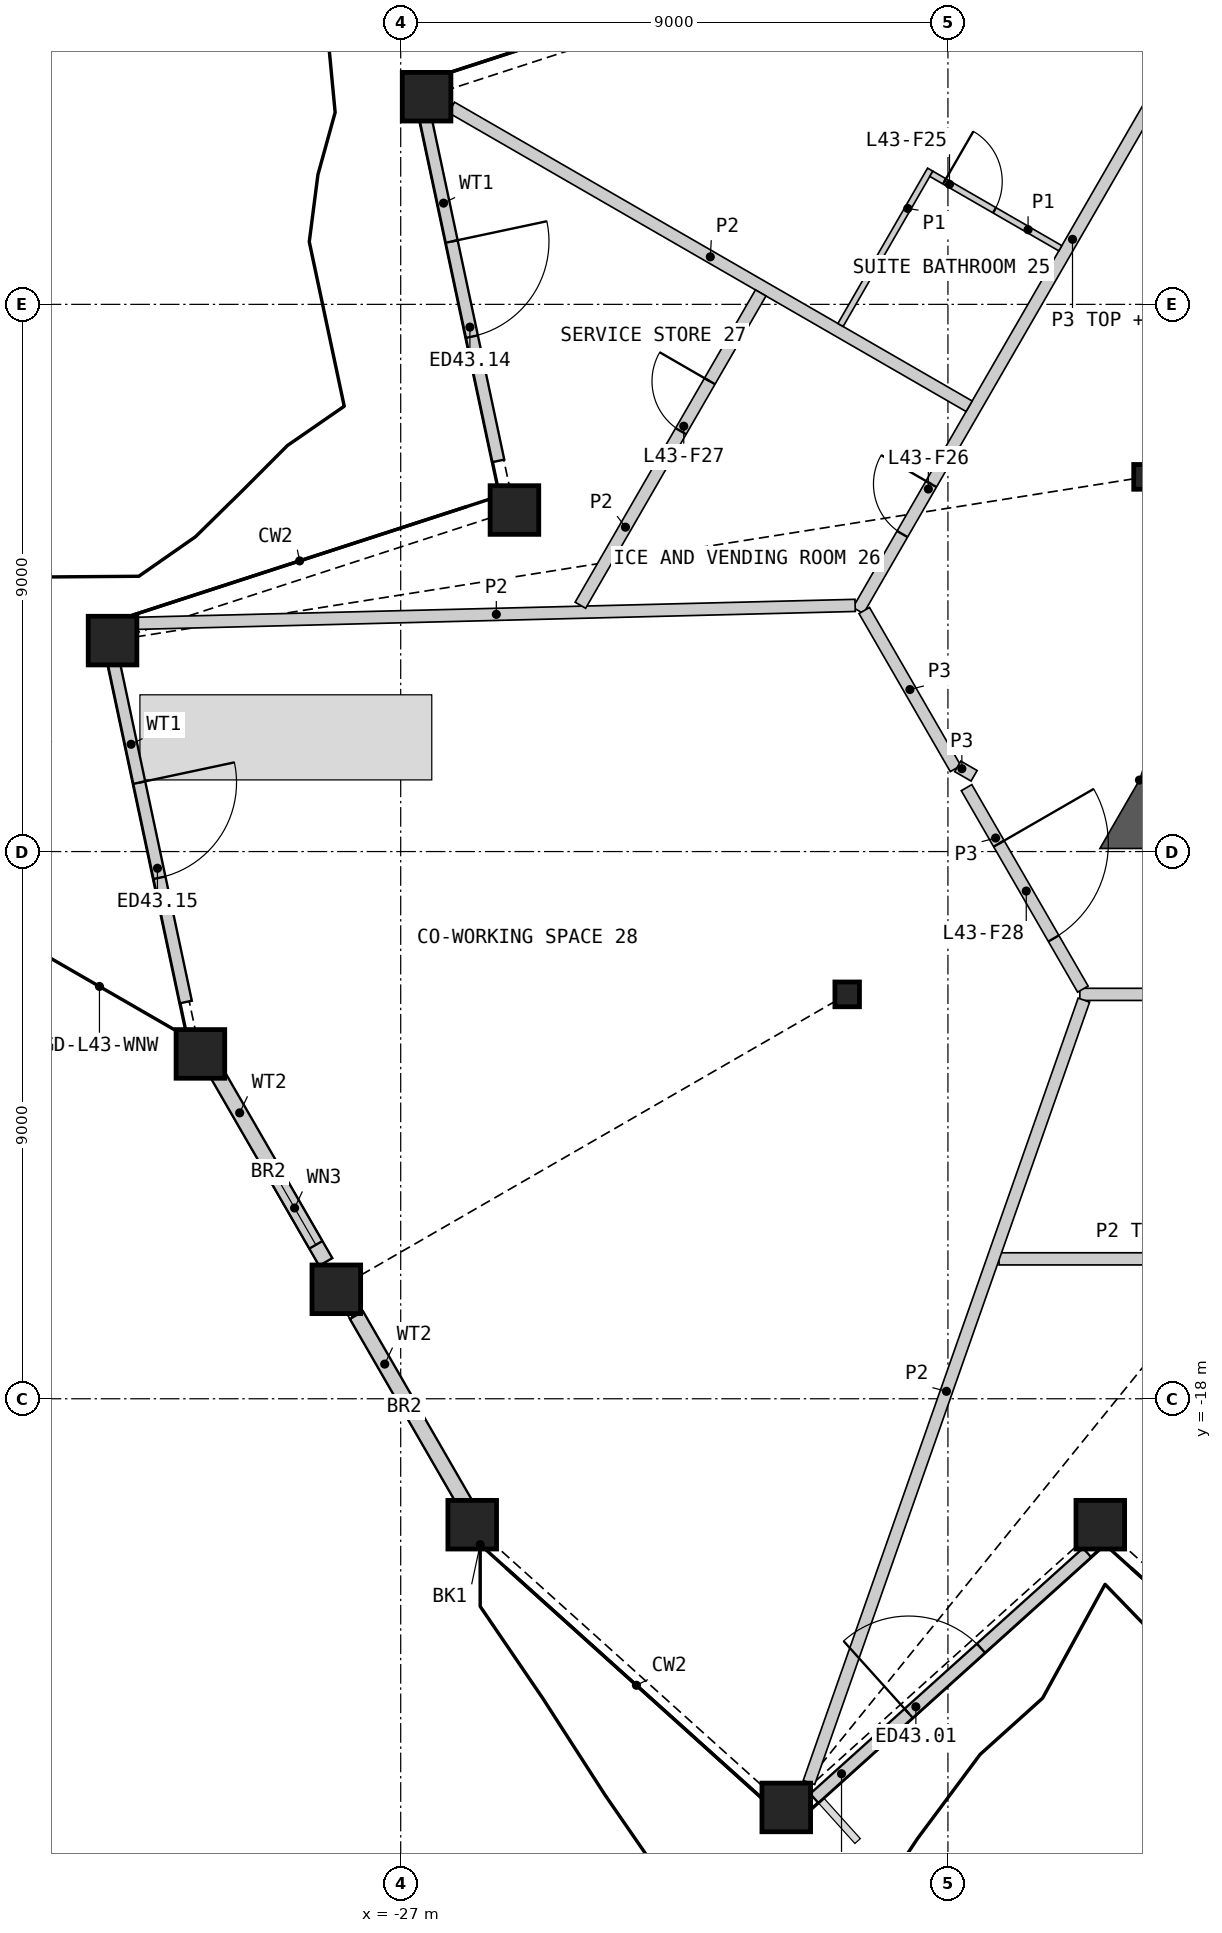
"""IFC4 building model, lengths in metres.
Left out: names, types, materials, properties, quantities, classifications, styles, units other than length and angle.
Written with IfcOpenShell. Run it as: python <this file> out.ifc"""

import sys

from ifc_helpers import new_model, si_unit, direction, frame, frame_2d, origin, origin_2d, place, context, subcontext, project, spatial, polyline, rectangle, hollow_rectangle, i_section, outline, extrude, element, fill, save


model = new_model("IFC4")
c1 = context("Model", 3, precision=1e-05, world=origin(), true_north=direction((0.0, 1.0)))
c2 = subcontext(c1, "Body", "Model", "MODEL_VIEW")
j1 = project(units=[si_unit("LENGTHUNIT", "METRE"), si_unit("PLANEANGLEUNIT", "RADIAN")], contexts=[c1])
p1 = place(None, origin())
s1 = spatial("IfcSite", under=j1, at=p1, CompositionType="ELEMENT")
p2 = place(p1, origin())
s2 = spatial("IfcBuilding", under=s1, at=p2, CompositionType="ELEMENT")
p3 = place(p2, frame((0.0, 0.0, 198.0)))
s3 = spatial("IfcBuildingStorey", under=s2, at=p3, CompositionType="ELEMENT", Elevation=198.0)
for number, where, z_axis, x_axis in (
    (1, (-25.823, -20.071, 0.0), (0.0, 0.0, 1.0), (1.0, 0.0, 0.0)),
    (2, (-20.659, -24.722, 0.0), (0.0, 0.0, 1.0), (1.0, 0.0, 0.0)),
    (3, (-15.494, -20.071, 0.0), (0.0, 0.0, 1.0), (1.0, 0.0, 0.0)),
    (4, (-26.574, 3.415, 0.0), (0.0, 0.0, 1.0), (1.0, 0.0, 0.0)),
    (5, (-25.129, -3.383, 0.0), (0.0, 0.0, 1.0), (1.0, 0.0, 0.0)),
    (6, (-31.739, -5.53, 0.0), (0.0, 0.0, 1.0), (1.0, 0.0, 0.0)),
    (7, (-30.294, -12.328, 0.0), (0.0, 0.0, 1.0), (1.0, 0.0, 0.0)),
    (8, (-28.059, -16.2, 0.0), (0.0, 0.0, 1.0), (1.0, 0.0, 0.0)),
):
    element("IfcColumn", number, at=place(p3, frame(where, z_axis=z_axis, x_axis=x_axis)), inside=s3, PredefinedType="COLUMN", context=c2, shape_type="SweptSolid", body=[
        extrude(hollow_rectangle(XDim=0.8, YDim=0.8, WallThickness=0.05, at=origin_2d()), origin(), (0.0, 0.0, 1.0), 3.6),
    ])
for number, where, z_axis, x_axis in (
    (9, (-14.743, -2.837, 0.0), (0.0, 0.0, 1.0), (1.0, 0.0, 0.0)),
    (10, (-19.657, -11.349, 0.0), (0.0, 0.0, 1.0), (1.0, 0.0, 0.0)),
):
    element("IfcColumn", number, at=place(p3, frame(where, z_axis=z_axis, x_axis=x_axis)), inside=s3, PredefinedType="COLUMN", context=c2, shape_type="SweptSolid", body=[
        extrude(i_section(OverallWidth=0.404, OverallDepth=0.407, WebThickness=0.027, FlangeThickness=0.044, at=origin_2d()), origin(), (0.0, 0.0, 1.0), 3.6),
    ])
p4 = place(p3, frame((-20.199, -24.571, 0.0), z_axis=(0.0, 0.0, 1.0), x_axis=(0.743151394339, 0.669123310827, 0.0)))
e11 = element("IfcWall", 11, at=p4, inside=s3, PredefinedType="SOLIDWALL", context=c2, shape_type="SweptSolid", body=[
    extrude(rectangle(XDim=6.039, YDim=0.2, at=frame_2d((3.019, 0.0))), origin(), (0.0, 0.0, 1.0), 2.701),
])
p5 = place(p4, frame((2.089, 0.0, 0.0)))
e12 = element("IfcOpeningElement", 12, at=p5, cuts=e11, PredefinedType="OPENING", context=c2, shape_type="SweptSolid", body=[
    extrude(rectangle(XDim=1.6, YDim=2.4, at=frame_2d((0.8, 1.2))), frame((0.0, 0.11, 0.0), z_axis=(0.0, -1.0, 0.0), x_axis=(1.0, 0.0, 0.0)), (0.0, 0.0, 1.0), 0.22),
])
p6 = place(p3, frame((-26.595, 3.078, 0.0), z_axis=(0.0, 0.0, 1.0), x_axis=(0.207907263894, -0.978148541695, 0.0)))
e13 = element("IfcWall", 13, at=p6, inside=s3, PredefinedType="SOLIDWALL", context=c2, shape_type="SweptSolid", body=[
    extrude(rectangle(XDim=5.779, YDim=0.2, at=frame_2d((2.889, 0.0))), origin(), (0.0, 0.0, 1.0), 2.701),
])
p7 = place(p6, frame((2.089, 0.0, 0.0)))
e14 = element("IfcOpeningElement", 14, at=p7, cuts=e13, PredefinedType="OPENING", context=c2, shape_type="SweptSolid", body=[
    extrude(rectangle(XDim=1.6, YDim=2.4, at=frame_2d((0.8, 1.2))), frame((0.0, 0.11, 0.0), z_axis=(0.0, -1.0, 0.0), x_axis=(1.0, 0.0, 0.0)), (0.0, 0.0, 1.0), 0.22),
])
p8 = place(p3, frame((-31.734, -5.822, 0.0), z_axis=(0.0, 0.0, 1.0), x_axis=(0.207907263894, -0.978148541695, 0.0)))
e15 = element("IfcWall", 15, at=p8, inside=s3, PredefinedType="SOLIDWALL", context=c2, shape_type="SweptSolid", body=[
    extrude(rectangle(XDim=5.779, YDim=0.2, at=frame_2d((2.889, 0.0))), origin(), (0.0, 0.0, 1.0), 2.701),
])
p9 = place(p8, frame((2.089, 0.0, 0.0)))
e16 = element("IfcOpeningElement", 16, at=p9, cuts=e15, PredefinedType="OPENING", context=c2, shape_type="SweptSolid", body=[
    extrude(rectangle(XDim=1.6, YDim=2.4, at=frame_2d((0.8, 1.2))), frame((0.0, 0.11, 0.0), z_axis=(0.0, -1.0, 0.0), x_axis=(1.0, 0.0, 0.0)), (0.0, 0.0, 1.0), 0.22),
])
p10 = place(p3, frame((-30.12, -12.48, 0.0), z_axis=(0.0, 0.0, 1.0), x_axis=(0.500034075199, -0.866005729565, 0.0)))
e17 = element("IfcWall", 17, at=p10, inside=s3, PredefinedType="SOLIDWALL", context=c2, shape_type="SweptSolid", body=[
    extrude(rectangle(XDim=3.775, YDim=0.25, at=frame_2d((1.888, 0.0))), origin(), (0.0, 0.0, 1.0), 2.701),
])
p11 = place(p10, frame((2.05, 0.0, 1.7)))
e18 = element("IfcOpeningElement", 18, at=p11, cuts=e17, PredefinedType="OPENING", context=c2, shape_type="SweptSolid", body=[
    extrude(rectangle(XDim=1.4, YDim=0.8, at=frame_2d((0.7, 0.4))), frame((0.0, 0.135, 0.0), z_axis=(0.0, -1.0, 0.0), x_axis=(1.0, 0.0, 0.0)), (0.0, 0.0, 1.0), 0.27),
])
p12 = place(p3, frame((-27.727, -16.625, 0.0), z_axis=(0.0, 0.0, 1.0), x_axis=(0.499995303914, -0.866028115054, 0.0)))
e19 = element("IfcWall", 19, at=p12, inside=s3, PredefinedType="SOLIDWALL", context=c2, shape_type="SweptSolid", body=[
    extrude(rectangle(XDim=3.718, YDim=0.25, at=frame_2d((1.859, 0.0))), origin(), (0.0, 0.0, 1.0), 2.701),
])
p13 = place(p3, frame((-12.65, -4.763, 0.0), z_axis=(0.0, 0.0, 1.0), x_axis=(-0.499996681051, -0.866027319972, 0.0)))
e20 = element("IfcWall", 20, at=p13, inside=s3, PredefinedType="SHEAR", context=c2, shape_type="SweptSolid", body=[
    extrude(rectangle(XDim=3.75, YDim=0.75, at=frame_2d((1.875, 0.0))), origin(), (0.0, 0.0, 1.0), 3.25),
])
p14 = place(p3, origin())
e21 = element("IfcWall", 21, at=p14, inside=s3, PredefinedType="SHEAR", context=c2, shape_type="SweptSolid", body=[
    extrude(outline(polyline([(-14.851, -7.824), (-14.201, -8.199), (-14.201, -8.949), (-15.5, -8.949), (-14.851, -7.824)])), origin(), (0.0, 0.0, 1.0), 3.25),
])
p15 = place(p3, frame((-19.476, -5.035, 0.0), z_axis=(0.0, 0.0, 1.0), x_axis=(0.500000757641, 0.86602496636, 0.0)))
e22 = element("IfcWall", 22, at=p15, inside=s3, PredefinedType="PARTITIONING", context=c2, shape_type="SweptSolid", body=[
    extrude(rectangle(XDim=28.198, YDim=0.2, at=frame_2d((14.099, 0.0))), origin(), (0.0, 0.0, 1.0), 3.25),
])
p16 = place(p15, frame((25.796, 0.0, 0.0)))
e23 = element("IfcOpeningElement", 23, at=p16, cuts=e22, PredefinedType="OPENING", context=c2, shape_type="SweptSolid", body=[
    extrude(rectangle(XDim=0.95, YDim=2.1, at=frame_2d((0.475, 1.05))), frame((0.0, 0.11, 0.0), z_axis=(0.0, -1.0, 0.0), x_axis=(1.0, 0.0, 0.0)), (0.0, 0.0, 1.0), 0.22),
])
p17 = place(p15, frame((14.603, 0.0, 0.0)))
e24 = element("IfcOpeningElement", 24, at=p17, cuts=e22, PredefinedType="OPENING", context=c2, shape_type="SweptSolid", body=[
    extrude(rectangle(XDim=1.1, YDim=2.1, at=frame_2d((0.55, 1.05))), frame((0.0, 0.11, 0.0), z_axis=(0.0, -1.0, 0.0), x_axis=(1.0, 0.0, 0.0)), (0.0, 0.0, 1.0), 0.22),
])
p18 = place(p15, frame((11.993, 0.0, 0.0)))
e25 = element("IfcOpeningElement", 25, at=p18, cuts=e22, PredefinedType="OPENING", context=c2, shape_type="SweptSolid", body=[
    extrude(rectangle(XDim=1.1, YDim=2.1, at=frame_2d((0.55, 1.05))), frame((0.0, 0.11, 0.0), z_axis=(0.0, -1.0, 0.0), x_axis=(1.0, 0.0, 0.0)), (0.0, 0.0, 1.0), 0.22),
])
p19 = place(p15, frame((1.452, 0.0, 0.0)))
e26 = element("IfcOpeningElement", 26, at=p19, cuts=e22, PredefinedType="OPENING", context=c2, shape_type="SweptSolid", body=[
    extrude(rectangle(XDim=0.95, YDim=2.1, at=frame_2d((0.475, 1.05))), frame((0.0, 0.11, 0.0), z_axis=(0.0, -1.0, 0.0), x_axis=(1.0, 0.0, 0.0)), (0.0, 0.0, 1.0), 0.22),
])
p20 = place(p3, frame((-15.831, -11.349, 0.0), z_axis=(0.0, 0.0, 1.0), x_axis=(1.0, 0.0, 0.0)))
e27 = element("IfcWall", 27, at=p20, inside=s3, PredefinedType="PARTITIONING", context=c2, shape_type="SweptSolid", body=[
    extrude(rectangle(XDim=5.789, YDim=0.2, at=frame_2d((2.894, 0.0))), origin(), (0.0, 0.0, 1.0), 3.25),
])
p21 = place(p3, frame((-17.694, -7.949, 0.0), z_axis=(0.0, 0.0, 1.0), x_axis=(0.499989446428, -0.866031496806, 0.0)))
e28 = element("IfcWall", 28, at=p21, inside=s3, PredefinedType="PARTITIONING", context=c2, shape_type="SweptSolid", body=[
    extrude(rectangle(XDim=3.826, YDim=0.2, at=frame_2d((1.913, 0.0))), origin(), (0.0, 0.0, 1.0), 3.25),
])
p22 = place(p21, frame((1.064, 0.0, 0.0)))
e29 = element("IfcOpeningElement", 29, at=p22, cuts=e28, PredefinedType="OPENING", context=c2, shape_type="SweptSolid", body=[
    extrude(rectangle(XDim=1.8, YDim=2.1, at=frame_2d((0.9, 1.05))), frame((0.0, 0.11, 0.0), z_axis=(0.0, -1.0, 0.0), x_axis=(1.0, 0.0, 0.0)), (0.0, 0.0, 1.0), 0.22),
])
p23 = place(p3, frame((-19.376, -5.035, 0.0), z_axis=(0.0, 0.0, 1.0), x_axis=(0.499952404951, -0.866052881055, 0.0)))
e30 = element("IfcWall", 30, at=p23, inside=s3, PredefinedType="PARTITIONING", context=c2, shape_type="SweptSolid", body=[
    extrude(rectangle(XDim=3.002, YDim=0.2, at=frame_2d((1.501, 0.0))), origin(), (0.0, 0.0, 1.0), 3.25),
])
p24 = place(p3, frame((-17.838, -7.599, 0.0), z_axis=(0.0, 0.0, 1.0), x_axis=(0.866054481515, -0.499949632511, 0.0)))
e31 = element("IfcWall", 31, at=p24, inside=s3, PredefinedType="PARTITIONING", context=c2, shape_type="SweptSolid", body=[
    extrude(rectangle(XDim=0.31, YDim=0.2, at=frame_2d((0.155, 0.0))), origin(), (0.0, 0.0, 1.0), 3.25),
])
p25 = place(p3, frame((-17.159, -15.699, 0.0), z_axis=(0.0, 0.0, 1.0), x_axis=(1.0, 0.0, 0.0)))
e32 = element("IfcWall", 32, at=p25, inside=s3, PredefinedType="PARTITIONING", context=c2, shape_type="SweptSolid", body=[
    extrude(rectangle(XDim=17.059, YDim=0.2, at=frame_2d((8.53, 0.0))), origin(), (0.0, 0.0, 1.0), 2.404),
])
p26 = place(p25, frame((7.655, 0.0, 0.0)))
e33 = element("IfcOpeningElement", 33, at=p26, cuts=e32, PredefinedType="OPENING", context=c2, shape_type="SweptSolid", body=[
    extrude(rectangle(XDim=0.95, YDim=2.1, at=frame_2d((0.475, 1.05))), frame((0.0, 0.11, 0.0), z_axis=(0.0, -1.0, 0.0), x_axis=(1.0, 0.0, 0.0)), (0.0, 0.0, 1.0), 0.22),
])
p27 = place(p3, frame((-20.286, -24.312, 0.0), z_axis=(0.0, 0.0, 1.0), x_axis=(0.331517429591, 0.943449094481, 0.0)))
e34 = element("IfcWall", 34, at=p27, inside=s3, PredefinedType="PARTITIONING", context=c2, shape_type="SweptSolid", body=[
    extrude(rectangle(XDim=13.639, YDim=0.2, at=frame_2d((6.82, 0.0))), origin(), (0.0, 0.0, 1.0), 2.404),
])
p28 = place(p3, frame((-31.329, -5.246, 0.0), z_axis=(0.0, 0.0, 1.0), x_axis=(0.999689013957, 0.024937429174, 0.0)))
e35 = element("IfcWall", 35, at=p28, inside=s3, PredefinedType="PARTITIONING", context=c2, shape_type="SweptSolid", body=[
    extrude(rectangle(XDim=11.807, YDim=0.2, at=frame_2d((5.903, 0.0))), origin(), (0.0, 0.0, 1.0), 2.404),
])
p29 = place(p3, frame((-26.164, 3.239, 0.0), z_axis=(0.0, 0.0, 1.0), x_axis=(0.866025932773, -0.499999083763, 0.0)))
e36 = element("IfcWall", 36, at=p29, inside=s3, PredefinedType="PARTITIONING", context=c2, shape_type="SweptSolid", body=[
    extrude(rectangle(XDim=9.83, YDim=0.2, at=frame_2d((4.915, 0.0))), origin(), (0.0, 0.0, 1.0), 2.404),
])
p30 = place(p3, frame((-24.045, -4.949, 0.0), z_axis=(0.0, 0.0, 1.0), x_axis=(0.500016988964, 0.866015594979, 0.0)))
e37 = element("IfcWall", 37, at=p30, inside=s3, PredefinedType="PARTITIONING", context=c2, shape_type="SweptSolid", body=[
    extrude(rectangle(XDim=5.931, YDim=0.2, at=frame_2d((2.966, 0.0))), origin(), (0.0, 0.0, 1.0), 2.404),
])
p31 = place(p30, frame((3.305, 0.0, 0.0)))
e38 = element("IfcOpeningElement", 38, at=p31, cuts=e37, PredefinedType="OPENING", context=c2, shape_type="SweptSolid", body=[
    extrude(rectangle(XDim=0.95, YDim=2.1, at=frame_2d((0.475, 1.05))), frame((0.0, 0.11, 0.0), z_axis=(0.0, -1.0, 0.0), x_axis=(1.0, 0.0, 0.0)), (0.0, 0.0, 1.0), 0.22),
])
p32 = place(p3, frame((-19.767, -0.339, 0.0), z_axis=(0.0, 0.0, 1.0), x_axis=(0.499939757307, 0.866060182126, 0.0)))
e39 = element("IfcWall", 39, at=p32, inside=s3, PredefinedType="PARTITIONING", context=c2, shape_type="SweptSolid", body=[
    extrude(rectangle(XDim=2.95, YDim=0.1, at=frame_2d((1.475, 0.0))), origin(), (0.0, 0.0, 1.0), 2.404),
])
p33 = place(p3, frame((-18.273, 2.147, 0.0), z_axis=(0.0, 0.0, 1.0), x_axis=(0.866014668023, -0.500018594424, 0.0)))
e40 = element("IfcWall", 40, at=p33, inside=s3, PredefinedType="PARTITIONING", context=c2, shape_type="SweptSolid", body=[
    extrude(rectangle(XDim=2.45, YDim=0.1, at=frame_2d((1.225, 0.0))), origin(), (0.0, 0.0, 1.0), 2.404),
])
p34 = place(p33, frame((0.25, 0.0, 0.0)))
e41 = element("IfcOpeningElement", 41, at=p34, cuts=e40, PredefinedType="OPENING", context=c2, shape_type="SweptSolid", body=[
    extrude(rectangle(XDim=0.95, YDim=2.1, at=frame_2d((0.475, 1.05))), frame((0.0, 0.06, 0.0), z_axis=(0.0, -1.0, 0.0), x_axis=(1.0, 0.0, 0.0)), (0.0, 0.0, 1.0), 0.12),
])
p35 = place(p5, origin())
e42 = element("IfcDoor", 42, at=p35, inside=s3, OperationType="DOUBLE_DOOR_SINGLE_SWING", PredefinedType="DOOR", context=c2, shape_type="SweptSolid", body=[
    extrude(rectangle(XDim=1.6, YDim=2.4, at=frame_2d((0.8, 1.2))), frame((0.0, 0.025, 0.0), z_axis=(0.0, -1.0, 0.0), x_axis=(1.0, 0.0, 0.0)), (0.0, 0.0, 1.0), 0.05),
])
fill(e12, e42)
p36 = place(p7, origin())
e43 = element("IfcDoor", 43, at=p36, inside=s3, OperationType="DOUBLE_DOOR_SINGLE_SWING", PredefinedType="DOOR", context=c2, shape_type="SweptSolid", body=[
    extrude(rectangle(XDim=1.6, YDim=2.4, at=frame_2d((0.8, 1.2))), frame((0.0, 0.025, 0.0), z_axis=(0.0, -1.0, 0.0), x_axis=(1.0, 0.0, 0.0)), (0.0, 0.0, 1.0), 0.05),
])
fill(e14, e43)
p37 = place(p9, origin())
e44 = element("IfcDoor", 44, at=p37, inside=s3, OperationType="DOUBLE_DOOR_SINGLE_SWING", PredefinedType="DOOR", context=c2, shape_type="SweptSolid", body=[
    extrude(rectangle(XDim=1.6, YDim=2.4, at=frame_2d((0.8, 1.2))), frame((0.0, 0.025, 0.0), z_axis=(0.0, -1.0, 0.0), x_axis=(1.0, 0.0, 0.0)), (0.0, 0.0, 1.0), 0.05),
])
fill(e16, e44)
p38 = place(p11, origin())
e45 = element("IfcWindow", 45, at=p38, inside=s3, PartitioningType="SINGLE_PANEL", PredefinedType="WINDOW", context=c2, shape_type="SweptSolid", body=[
    extrude(rectangle(XDim=1.4, YDim=0.8, at=frame_2d((0.7, 0.4))), frame((0.0, 0.03, 0.0), z_axis=(0.0, -1.0, 0.0), x_axis=(1.0, 0.0, 0.0)), (0.0, 0.0, 1.0), 0.06),
])
fill(e18, e45)
p39 = place(p34, origin())
e46 = element("IfcDoor", 46, at=p39, inside=s3, OperationType="SINGLE_SWING_LEFT", PredefinedType="DOOR", context=c2, shape_type="SweptSolid", body=[
    extrude(rectangle(XDim=0.95, YDim=2.1, at=frame_2d((0.475, 1.05))), frame((0.0, 0.025, 0.0), z_axis=(0.0, -1.0, 0.0), x_axis=(1.0, 0.0, 0.0)), (0.0, 0.0, 1.0), 0.05),
])
fill(e41, e46)
p40 = place(p19, origin())
e47 = element("IfcDoor", 47, at=p40, inside=s3, OperationType="SINGLE_SWING_RIGHT", PredefinedType="DOOR", context=c2, shape_type="SweptSolid", body=[
    extrude(rectangle(XDim=0.95, YDim=2.1, at=frame_2d((0.475, 1.05))), frame((0.0, 0.025, 0.0), z_axis=(0.0, -1.0, 0.0), x_axis=(1.0, 0.0, 0.0)), (0.0, 0.0, 1.0), 0.05),
])
fill(e26, e47)
p41 = place(p31, origin())
e48 = element("IfcDoor", 48, at=p41, inside=s3, OperationType="SINGLE_SWING_RIGHT", PredefinedType="DOOR", context=c2, shape_type="SweptSolid", body=[
    extrude(rectangle(XDim=0.95, YDim=2.1, at=frame_2d((0.475, 1.05))), frame((0.0, 0.025, 0.0), z_axis=(0.0, -1.0, 0.0), x_axis=(1.0, 0.0, 0.0)), (0.0, 0.0, 1.0), 0.05),
])
fill(e38, e48)
p42 = place(p22, origin())
e49 = element("IfcDoor", 49, at=p42, inside=s3, OperationType="DOUBLE_DOOR_SINGLE_SWING", PredefinedType="DOOR", context=c2, shape_type="SweptSolid", body=[
    extrude(rectangle(XDim=1.8, YDim=2.1, at=frame_2d((0.9, 1.05))), frame((0.0, 0.025, 0.0), z_axis=(0.0, -1.0, 0.0), x_axis=(1.0, 0.0, 0.0)), (0.0, 0.0, 1.0), 0.05),
])
fill(e29, e49)
save(model, sys.argv[1])
